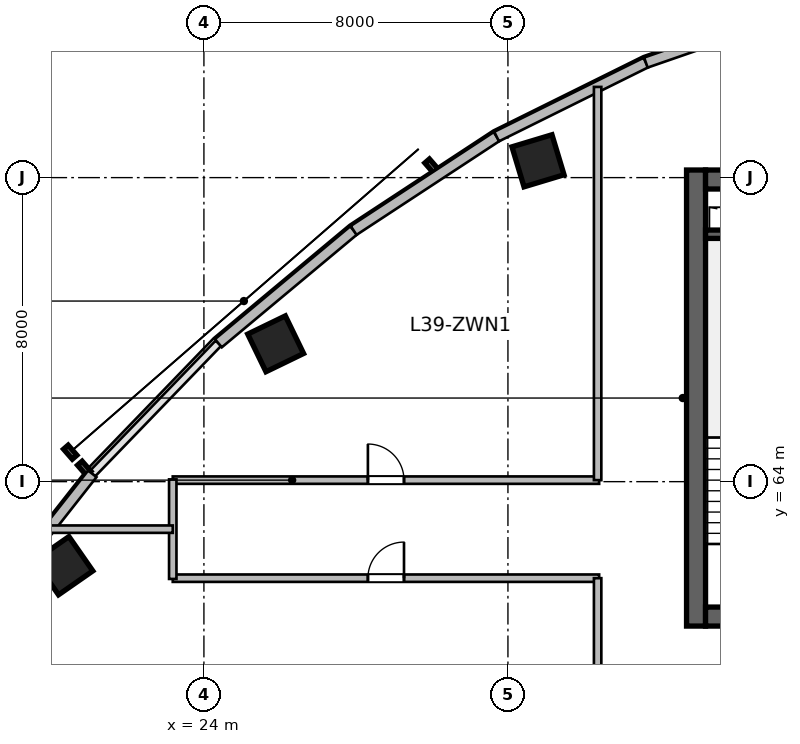
"""IFC4 building model, lengths in metres.
Left out: names, types, materials, properties, quantities, classifications, styles, units other than length and angle.
Written with IfcOpenShell. Run it as: python <this file> out.ifc"""

import sys

from ifc_helpers import new_model, si_unit, direction, frame, frame_2d, origin, origin_2d, place, context, subcontext, project, spatial, rectangle, extrude, source, transform, mapped, element, fill, save


model = new_model("IFC4")
c1 = context("Model", 3, precision=1e-05, world=origin(), true_north=direction((0.0, 1.0)))
c2 = subcontext(c1, "Body", "Model", "MODEL_VIEW")
j1 = project(units=[si_unit("LENGTHUNIT", "METRE"), si_unit("PLANEANGLEUNIT", "RADIAN")], contexts=[c1])
p1 = place(None, origin())
s1 = spatial("IfcSite", under=j1, at=p1, CompositionType="ELEMENT")
p2 = place(p1, origin())
s2 = spatial("IfcBuilding", under=s1, at=p2, CompositionType="ELEMENT")
p3 = place(p2, frame((0.0, 0.0, 162.3)))
s3 = spatial("IfcBuildingStorey", under=s2, at=p3, CompositionType="ELEMENT", Elevation=162.3)
m1 = source(origin(), c2, "Body", "SweptSolid", [
    extrude(rectangle(XDim=12.0, YDim=0.5, at=frame_2d((6.0, 0.0))), origin(), (0.0, 0.0, 1.0), 3.9),
])
p4 = place(p3, frame((36.95, 60.2, 0.0), z_axis=(0.0, 0.0, 1.0), x_axis=(0.0, 1.0, 0.0)))
e1 = element("IfcWall", 1, at=p4, inside=s3, PredefinedType="SHEAR", context=c2, shape_type="MappedRepresentation", body=[
    mapped(m1, transform((0.0, 0.0, 0.0), scale=1.0)),
])
m2 = source(origin(), c2, "Body", "SweptSolid", [
    extrude(rectangle(XDim=21.6, YDim=0.5, at=frame_2d((10.8, 0.0))), origin(), (0.0, 0.0, 1.0), 3.9),
])
p5 = place(p3, frame((37.2, 60.45, 0.0), z_axis=(0.0, 0.0, 1.0), x_axis=(1.0, 0.0, 0.0)))
e2 = element("IfcWall", 2, at=p5, inside=s3, PredefinedType="SHEAR", context=c2, shape_type="MappedRepresentation", body=[
    mapped(m2, transform((0.0, 0.0, 0.0), scale=1.0)),
])
p6 = place(p5, frame((1.1, 0.0, 0.0)))
e3 = element("IfcOpeningElement", 3, at=p6, cuts=e2, PredefinedType="OPENING", context=c2, shape_type="SweptSolid", body=[
    extrude(rectangle(XDim=1.15, YDim=2.15, at=frame_2d((0.575, 1.075))), frame((0.0, 0.26, 0.0), z_axis=(0.0, -1.0, 0.0), x_axis=(1.0, 0.0, 0.0)), (0.0, 0.0, 1.0), 0.52),
])
p7 = place(p5, frame((19.5, 0.0, 0.0)))
e4 = element("IfcOpeningElement", 4, at=p7, cuts=e2, PredefinedType="OPENING", context=c2, shape_type="SweptSolid", body=[
    extrude(rectangle(XDim=0.9, YDim=2.1, at=frame_2d((0.45, 1.05))), frame((0.0, 0.26, 0.0), z_axis=(0.0, -1.0, 0.0), x_axis=(1.0, 0.0, 0.0)), (0.0, 0.0, 1.0), 0.52),
])
p8 = place(p5, frame((12.02, 0.0, 0.0)))
e5 = element("IfcOpeningElement", 5, at=p8, cuts=e2, PredefinedType="OPENING", context=c2, shape_type="SweptSolid", body=[
    extrude(rectangle(XDim=1.6, YDim=2.15, at=frame_2d((0.8, 1.075))), frame((0.0, 0.26, 0.0), z_axis=(0.0, -1.0, 0.0), x_axis=(1.0, 0.0, 0.0)), (0.0, 0.0, 1.0), 0.52),
])
p9 = place(p3, frame((37.2, 71.95, 0.0), z_axis=(0.0, 0.0, 1.0), x_axis=(1.0, 0.0, 0.0)))
e6 = element("IfcWall", 6, at=p9, inside=s3, PredefinedType="SHEAR", context=c2, shape_type="MappedRepresentation", body=[
    mapped(m2, transform((0.0, 0.0, 0.0), scale=1.0)),
])
p10 = place(p9, frame((1.2, 0.0, 0.0)))
e7 = element("IfcOpeningElement", 7, at=p10, cuts=e6, PredefinedType="OPENING", context=c2, shape_type="SweptSolid", body=[
    extrude(rectangle(XDim=0.9, YDim=2.1, at=frame_2d((0.45, 1.05))), frame((0.0, 0.26, 0.0), z_axis=(0.0, -1.0, 0.0), x_axis=(1.0, 0.0, 0.0)), (0.0, 0.0, 1.0), 0.52),
])
p11 = place(p9, frame((14.7, 0.0, 0.0)))
e8 = element("IfcOpeningElement", 8, at=p11, cuts=e6, PredefinedType="OPENING", context=c2, shape_type="SweptSolid", body=[
    extrude(rectangle(XDim=1.2, YDim=2.15, at=frame_2d((0.6, 1.075))), frame((0.0, 0.26, 0.0), z_axis=(0.0, -1.0, 0.0), x_axis=(1.0, 0.0, 0.0)), (0.0, 0.0, 1.0), 0.52),
])
p12 = place(p9, frame((4.15, 0.0, 0.0)))
e9 = element("IfcOpeningElement", 9, at=p12, cuts=e6, PredefinedType="OPENING", context=c2, shape_type="SweptSolid", body=[
    extrude(rectangle(XDim=1.3, YDim=2.15, at=frame_2d((0.65, 1.075))), frame((0.0, 0.26, 0.0), z_axis=(0.0, -1.0, 0.0), x_axis=(1.0, 0.0, 0.0)), (0.0, 0.0, 1.0), 0.52),
])
p13 = place(p9, frame((7.1, 0.0, 0.0)))
e10 = element("IfcOpeningElement", 10, at=p13, cuts=e6, PredefinedType="OPENING", context=c2, shape_type="SweptSolid", body=[
    extrude(rectangle(XDim=0.9, YDim=2.1, at=frame_2d((0.45, 1.05))), frame((0.0, 0.26, 0.0), z_axis=(0.0, -1.0, 0.0), x_axis=(1.0, 0.0, 0.0)), (0.0, 0.0, 1.0), 0.52),
])
m3 = source(origin(), c2, "Body", "SweptSolid", [
    extrude(rectangle(XDim=3.27, YDim=0.22, at=frame_2d((1.635, 0.0))), origin(), (0.0, 0.0, 1.0), 3.9),
])
p14 = place(p3, frame((37.2, 70.51, 0.0), z_axis=(0.0, 0.0, 1.0), x_axis=(1.0, 0.0, 0.0)))
e11 = element("IfcWall", 11, at=p14, inside=s3, PredefinedType="SHEAR", context=c2, shape_type="MappedRepresentation", body=[
    mapped(m3, transform((0.0, 0.0, 0.0), scale=1.0)),
])
m4 = source(origin(), c2, "Body", "SweptSolid", [
    extrude(rectangle(XDim=1.1, YDim=1.1, at=origin_2d()), origin(), (0.0, 0.0, 1.0), 3.9),
])
for number, where, z_axis, x_axis in (
    (12, (20.311, 61.789, 0.0), (0.0, 0.0, 1.0), (-0.571, 0.821, 0.0)),
    (13, (25.888, 67.627, 0.0), (0.0, 0.0, 1.0), (-0.436, 0.9, 0.0)),
    (14, (32.791, 72.442, 0.0), (0.0, 0.0, 1.0), (-0.289, 0.957, 0.0)),
):
    element("IfcColumn", number, at=place(p3, frame(where, z_axis=z_axis, x_axis=x_axis)), inside=s3, PredefinedType="COLUMN", context=c2, shape_type="MappedRepresentation", body=[
        mapped(m4, transform((0.0, 0.0, 0.0), scale=1.0)),
    ])
m5 = source(origin(), c2, "Body", "SweptSolid", [
    extrude(rectangle(XDim=4.922, YDim=0.28, at=frame_2d((2.461, 0.0))), origin(), (0.0, 0.0, 1.0), 3.65),
])
p15 = place(p3, frame((18.021, 60.338, 0.0), z_axis=(0.0, 0.0, 1.0), x_axis=(0.61817639101, 0.786039407153, 0.0)))
e15 = element("IfcWall", 15, at=p15, inside=s3, PredefinedType="SOLIDWALL", context=c2, shape_type="MappedRepresentation", body=[
    mapped(m5, transform((0.0, 0.0, 0.0), scale=1.0)),
])
m6 = source(origin(), c2, "Body", "SweptSolid", [
    extrude(rectangle(XDim=4.634, YDim=0.28, at=frame_2d((2.317, 0.0))), origin(), (0.0, 0.0, 1.0), 3.65),
])
p16 = place(p3, frame((24.381, 67.642, 0.0), z_axis=(0.0, 0.0, 1.0), x_axis=(0.767910229096, 0.640557475993, 0.0)))
e16 = element("IfcWall", 16, at=p16, inside=s3, PredefinedType="SOLIDWALL", context=c2, shape_type="MappedRepresentation", body=[
    mapped(m6, transform((0.0, 0.0, 0.0), scale=1.0)),
])
m7 = source(origin(), c2, "Body", "SweptSolid", [
    extrude(rectangle(XDim=4.501, YDim=0.28, at=frame_2d((2.25, 0.0))), origin(), (0.0, 0.0, 1.0), 3.65),
])
p17 = place(p3, frame((27.939, 70.61, 0.0), z_axis=(0.0, 0.0, 1.0), x_axis=(0.835984920737, 0.548752414391, 0.0)))
e17 = element("IfcWall", 17, at=p17, inside=s3, PredefinedType="SOLIDWALL", context=c2, shape_type="MappedRepresentation", body=[
    mapped(m7, transform((0.0, 0.0, 0.0), scale=1.0)),
])
m8 = source(origin(), c2, "Body", "SweptSolid", [
    extrude(rectangle(XDim=4.384, YDim=0.28, at=frame_2d((2.192, 0.0))), origin(), (0.0, 0.0, 1.0), 3.65),
])
p18 = place(p3, frame((31.702, 73.08, 0.0), z_axis=(0.0, 0.0, 1.0), x_axis=(0.895969968053, 0.444114643248, 0.0)))
e18 = element("IfcWall", 18, at=p18, inside=s3, PredefinedType="SOLIDWALL", context=c2, shape_type="MappedRepresentation", body=[
    mapped(m8, transform((0.0, 0.0, 0.0), scale=1.0)),
])
m9 = source(origin(), c2, "Body", "SweptSolid", [
    extrude(rectangle(XDim=4.29, YDim=0.28, at=frame_2d((2.145, 0.0))), origin(), (0.0, 0.0, 1.0), 3.65),
])
p19 = place(p3, frame((35.63, 75.027, 0.0), z_axis=(0.0, 0.0, 1.0), x_axis=(0.944883859218, 0.3274057003, 0.0)))
e19 = element("IfcWall", 19, at=p19, inside=s3, PredefinedType="SOLIDWALL", context=c2, shape_type="MappedRepresentation", body=[
    mapped(m9, transform((0.0, 0.0, 0.0), scale=1.0)),
])
m10 = source(origin(), c2, "Body", "SweptSolid", [
    extrude(rectangle(XDim=11.22, YDim=0.195, at=frame_2d((5.61, 0.0))), origin(), (0.0, 0.0, 1.0), 3.65),
])
p20 = place(p3, frame((23.18, 64.04, 0.0), z_axis=(0.0, 0.0, 1.0), x_axis=(1.0, 0.0, 0.0)))
e20 = element("IfcWall", 20, at=p20, inside=s3, PredefinedType="PARTITIONING", context=c2, shape_type="MappedRepresentation", body=[
    mapped(m10, transform((0.0, 0.0, 0.0), scale=1.0)),
])
p21 = place(p20, frame((5.135, 0.0, 0.0)))
e21 = element("IfcOpeningElement", 21, at=p21, cuts=e20, PredefinedType="OPENING", context=c2, shape_type="SweptSolid", body=[
    extrude(rectangle(XDim=0.95, YDim=2.1, at=frame_2d((0.475, 1.05))), frame((0.0, 0.107, 0.0), z_axis=(0.0, -1.0, 0.0), x_axis=(1.0, 0.0, 0.0)), (0.0, 0.0, 1.0), 0.215),
])
p22 = place(p3, frame((23.18, 61.46, 0.0), z_axis=(0.0, 0.0, 1.0), x_axis=(1.0, 0.0, 0.0)))
e22 = element("IfcWall", 22, at=p22, inside=s3, PredefinedType="PARTITIONING", context=c2, shape_type="MappedRepresentation", body=[
    mapped(m10, transform((0.0, 0.0, 0.0), scale=1.0)),
])
p23 = place(p22, frame((5.135, 0.0, 0.0)))
e23 = element("IfcOpeningElement", 23, at=p23, cuts=e22, PredefinedType="OPENING", context=c2, shape_type="SweptSolid", body=[
    extrude(rectangle(XDim=0.95, YDim=2.1, at=frame_2d((0.475, 1.05))), frame((0.0, 0.107, 0.0), z_axis=(0.0, -1.0, 0.0), x_axis=(1.0, 0.0, 0.0)), (0.0, 0.0, 1.0), 0.215),
])
m11 = source(origin(), c2, "Body", "SweptSolid", [
    extrude(rectangle(XDim=12.126, YDim=0.195, at=frame_2d((6.063, 0.0))), origin(), (0.0, 0.0, 1.0), 3.65),
])
p24 = place(p3, frame((34.36, 49.334, 0.0), z_axis=(0.0, 0.0, 1.0), x_axis=(0.0, 1.0, 0.0)))
e24 = element("IfcWall", 24, at=p24, inside=s3, PredefinedType="PARTITIONING", context=c2, shape_type="MappedRepresentation", body=[
    mapped(m11, transform((0.0, 0.0, 0.0), scale=1.0)),
])
m12 = source(origin(), c2, "Body", "SweptSolid", [
    extrude(rectangle(XDim=10.346, YDim=0.195, at=frame_2d((5.173, 0.0))), origin(), (0.0, 0.0, 1.0), 3.65),
])
p25 = place(p3, frame((34.36, 64.04, 0.0), z_axis=(0.0, 0.0, 1.0), x_axis=(0.0, 1.0, 0.0)))
e25 = element("IfcWall", 25, at=p25, inside=s3, PredefinedType="PARTITIONING", context=c2, shape_type="MappedRepresentation", body=[
    mapped(m12, transform((0.0, 0.0, 0.0), scale=1.0)),
])
m13 = source(origin(), c2, "Body", "SweptSolid", [
    extrude(rectangle(XDim=2.62, YDim=0.195, at=frame_2d((1.31, 0.0))), origin(), (0.0, 0.0, 1.0), 3.65),
])
p26 = place(p3, frame((23.18, 61.44, 0.0), z_axis=(0.0, 0.0, 1.0), x_axis=(0.0, 1.0, 0.0)))
e26 = element("IfcWall", 26, at=p26, inside=s3, PredefinedType="PARTITIONING", context=c2, shape_type="MappedRepresentation", body=[
    mapped(m13, transform((0.0, 0.0, 0.0), scale=1.0)),
])
m14 = source(origin(), c2, "Body", "SweptSolid", [
    extrude(rectangle(XDim=3.249, YDim=0.195, at=frame_2d((1.625, 0.0))), origin(), (0.0, 0.0, 1.0), 3.65),
])
p27 = place(p3, frame((19.931, 62.75, 0.0), z_axis=(0.0, 0.0, 1.0), x_axis=(1.0, 0.0, 0.0)))
e27 = element("IfcWall", 27, at=p27, inside=s3, PredefinedType="PARTITIONING", context=c2, shape_type="MappedRepresentation", body=[
    mapped(m14, transform((0.0, 0.0, 0.0), scale=1.0)),
])
m15 = source(origin(), c2, "Body", "SweptSolid", [
    extrude(rectangle(XDim=0.95, YDim=2.1, at=frame_2d((0.475, 1.05))), frame((0.0, 0.025, 0.0), z_axis=(0.0, -1.0, 0.0), x_axis=(1.0, 0.0, 0.0)), (0.0, 0.0, 1.0), 0.05),
])
p28 = place(p21, origin())
e28 = element("IfcDoor", 28, at=p28, inside=s3, OperationType="SINGLE_SWING_LEFT", PredefinedType="DOOR", context=c2, shape_type="MappedRepresentation", body=[
    mapped(m15, transform((0.0, 0.0, 0.0), scale=1.0)),
])
fill(e21, e28)
p29 = place(p23, origin())
e29 = element("IfcDoor", 29, at=p29, inside=s3, OperationType="SINGLE_SWING_RIGHT", PredefinedType="DOOR", context=c2, shape_type="MappedRepresentation", body=[
    mapped(m15, transform((0.0, 0.0, 0.0), scale=1.0)),
])
fill(e23, e29)
save(model, sys.argv[1])
